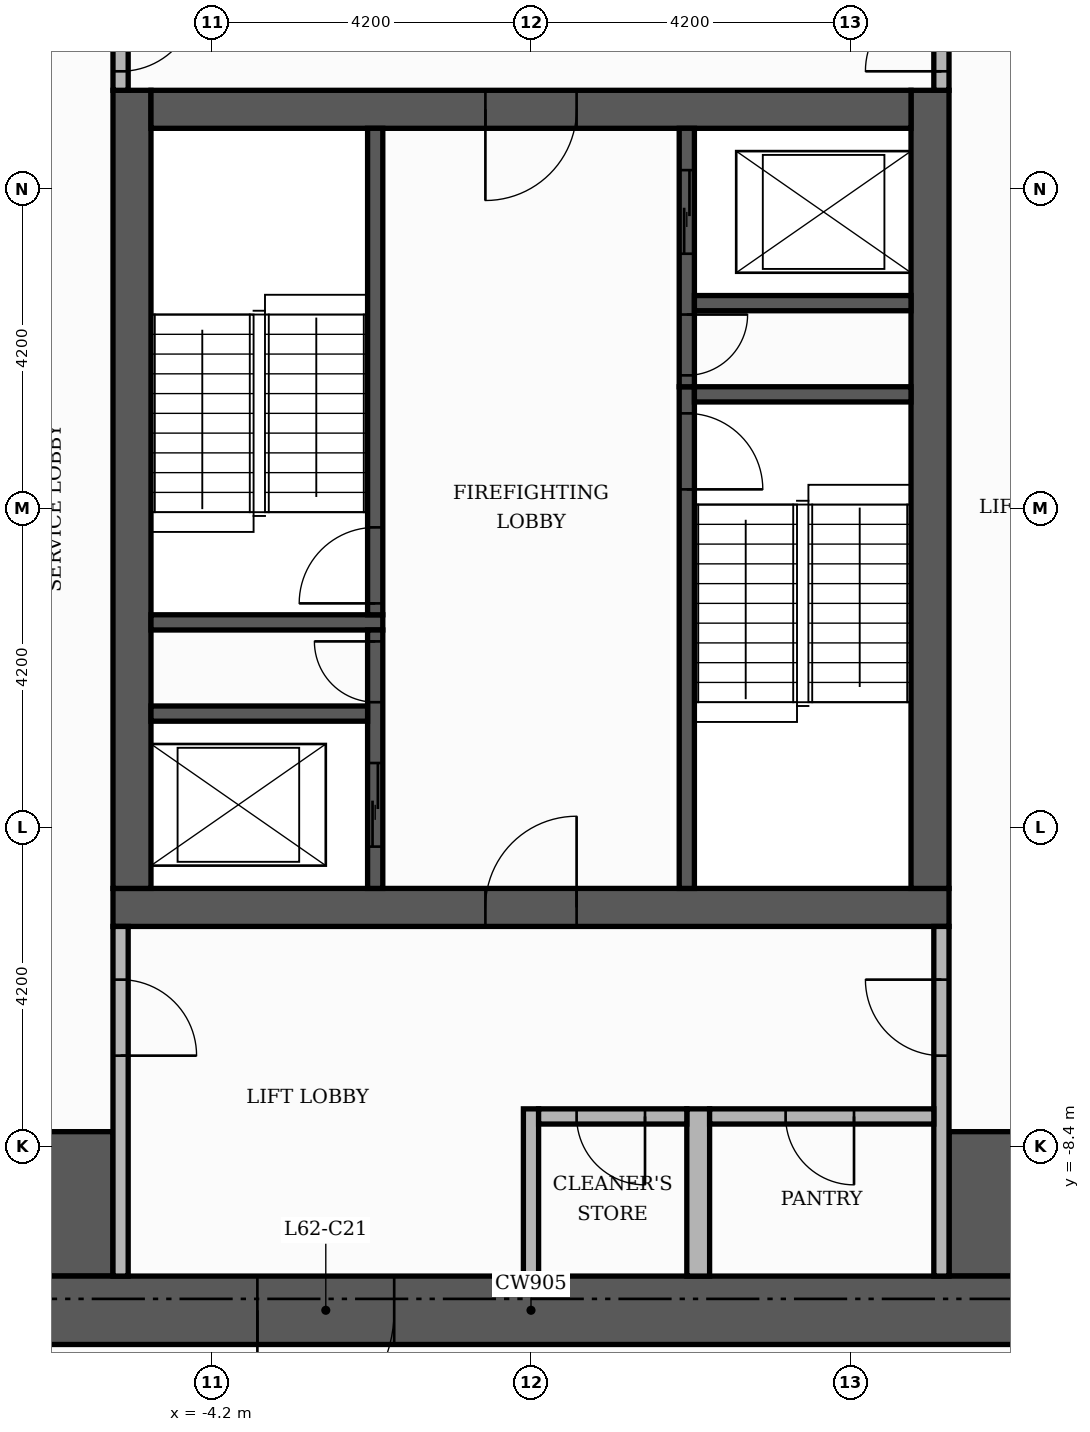
"""IFC4 building model, lengths in metres.
Left out: names, types, materials, properties, quantities, classifications, styles, units other than length and angle.
Written with IfcOpenShell. Run it as: python <this file> out.ifc"""

import sys

from ifc_helpers import new_model, si_unit, direction, frame, frame_2d, origin, place, context, subcontext, project, spatial, rectangle, extrude, element, fill, save


model = new_model("IFC4")
c1 = context("Model", 3, precision=1e-05, world=origin(), true_north=direction((0.0, 1.0)))
c2 = subcontext(c1, "Body", "Model", "MODEL_VIEW")
j1 = project(units=[si_unit("LENGTHUNIT", "METRE"), si_unit("PLANEANGLEUNIT", "RADIAN")], contexts=[c1])
p1 = place(None, origin())
s1 = spatial("IfcSite", under=j1, at=p1, CompositionType="ELEMENT")
p2 = place(p1, origin())
s2 = spatial("IfcBuilding", under=s1, at=p2, CompositionType="ELEMENT")
p3 = place(p2, frame((0.0, 0.0, 260.1)))
s3 = spatial("IfcBuildingStorey", under=s2, at=p3, CompositionType="ELEMENT", Elevation=260.1)
p4 = place(p3, frame((-5.5, -5.25, 0.0), z_axis=(0.0, 0.0, 1.0), x_axis=(1.0, 0.0, 0.0)))
e1 = element("IfcWall", 1, at=p4, inside=s3, PredefinedType="SHEAR", context=c2, shape_type="SweptSolid", body=[
    extrude(rectangle(XDim=11.0, YDim=0.5, at=frame_2d((5.5, 0.0))), origin(), (0.0, 0.0, 1.0), 3.48),
])
p5 = place(p4, frame((4.9, 0.0, 0.0)))
e2 = element("IfcOpeningElement", 2, at=p5, cuts=e1, PredefinedType="OPENING", context=c2, shape_type="SweptSolid", body=[
    extrude(rectangle(XDim=1.2, YDim=2.1, at=frame_2d((0.6, 1.05))), frame((0.0, 0.26, 0.0), z_axis=(0.0, -1.0, 0.0), x_axis=(1.0, 0.0, 0.0)), (0.0, 0.0, 1.0), 0.52),
])
for number, where, z_axis, x_axis in (
    (3, (-5.25, -5.0, 0.0), (0.0, 0.0, 1.0), (0.0, 1.0, 0.0)),
    (4, (5.25, -5.0, 0.0), (0.0, 0.0, 1.0), (0.0, 1.0, 0.0)),
):
    element("IfcWall", number, at=place(p3, frame(where, z_axis=z_axis, x_axis=x_axis)), inside=s3, PredefinedType="SHEAR", context=c2, shape_type="SweptSolid", body=[
        extrude(rectangle(XDim=10.5, YDim=0.5, at=frame_2d((5.25, 0.0))), origin(), (0.0, 0.0, 1.0), 3.48),
    ])
p6 = place(p3, frame((-5.0, 5.25, 0.0), z_axis=(0.0, 0.0, 1.0), x_axis=(1.0, 0.0, 0.0)))
e5 = element("IfcWall", 5, at=p6, inside=s3, PredefinedType="SHEAR", context=c2, shape_type="SweptSolid", body=[
    extrude(rectangle(XDim=10.0, YDim=0.5, at=frame_2d((5.0, 0.0))), origin(), (0.0, 0.0, 1.0), 3.48),
])
p7 = place(p6, frame((4.4, 0.0, 0.0)))
e6 = element("IfcOpeningElement", 6, at=p7, cuts=e5, PredefinedType="OPENING", context=c2, shape_type="SweptSolid", body=[
    extrude(rectangle(XDim=1.2, YDim=2.1, at=frame_2d((0.6, 1.05))), frame((0.0, 0.26, 0.0), z_axis=(0.0, -1.0, 0.0), x_axis=(1.0, 0.0, 0.0)), (0.0, 0.0, 1.0), 0.52),
])
for number, where, z_axis, x_axis in (
    (7, (-10.1, -9.15, 0.0), (0.0, 0.0, 1.0), (1.0, 0.0, 0.0)),
    (8, (5.5, -9.15, 0.0), (0.0, 0.0, 1.0), (1.0, 0.0, 0.0)),
):
    element("IfcWall", number, at=place(p3, frame(where, z_axis=z_axis, x_axis=x_axis)), inside=s3, PredefinedType="SHEAR", context=c2, shape_type="SweptSolid", body=[
        extrude(rectangle(XDim=4.6, YDim=1.9, at=frame_2d((2.3, 0.0))), origin(), (0.0, 0.0, 1.0), 3.48),
    ])
p8 = place(p3, frame((2.05, -5.0, 0.0), z_axis=(0.0, 0.0, 1.0), x_axis=(0.0, 1.0, 0.0)))
e9 = element("IfcWall", 9, at=p8, inside=s3, PredefinedType="SHEAR", context=c2, shape_type="SweptSolid", body=[
    extrude(rectangle(XDim=6.6, YDim=0.2, at=frame_2d((3.3, 0.0))), origin(), (0.0, 0.0, 1.0), 3.48),
])
p9 = place(p8, frame((5.25, 0.0, 0.0)))
e10 = element("IfcOpeningElement", 10, at=p9, cuts=e9, PredefinedType="OPENING", context=c2, shape_type="SweptSolid", body=[
    extrude(rectangle(XDim=1.0, YDim=2.1, at=frame_2d((0.5, 1.05))), frame((0.0, 0.11, 0.0), z_axis=(0.0, -1.0, 0.0), x_axis=(1.0, 0.0, 0.0)), (0.0, 0.0, 1.0), 0.22),
])
p10 = place(p3, frame((-5.0, -1.5, 0.0), z_axis=(0.0, 0.0, 1.0), x_axis=(1.0, 0.0, 0.0)))
e11 = element("IfcWall", 11, at=p10, inside=s3, PredefinedType="SHEAR", context=c2, shape_type="SweptSolid", body=[
    extrude(rectangle(XDim=3.05, YDim=0.2, at=frame_2d((1.525, 0.0))), origin(), (0.0, 0.0, 1.0), 3.48),
])
p11 = place(p3, frame((-2.05, -1.4, 0.0), z_axis=(0.0, 0.0, 1.0), x_axis=(0.0, 1.0, 0.0)))
e12 = element("IfcWall", 12, at=p11, inside=s3, PredefinedType="SHEAR", context=c2, shape_type="SweptSolid", body=[
    extrude(rectangle(XDim=6.4, YDim=0.2, at=frame_2d((3.2, 0.0))), origin(), (0.0, 0.0, 1.0), 3.48),
])
p12 = place(p11, frame((0.15, 0.0, 0.0)))
e13 = element("IfcOpeningElement", 13, at=p12, cuts=e12, PredefinedType="OPENING", context=c2, shape_type="SweptSolid", body=[
    extrude(rectangle(XDim=1.0, YDim=2.1, at=frame_2d((0.5, 1.05))), frame((0.0, 0.11, 0.0), z_axis=(0.0, -1.0, 0.0), x_axis=(1.0, 0.0, 0.0)), (0.0, 0.0, 1.0), 0.22),
])
p13 = place(p3, frame((2.15, 1.5, 0.0), z_axis=(0.0, 0.0, 1.0), x_axis=(1.0, 0.0, 0.0)))
e14 = element("IfcWall", 14, at=p13, inside=s3, PredefinedType="SHEAR", context=c2, shape_type="SweptSolid", body=[
    extrude(rectangle(XDim=2.85, YDim=0.2, at=frame_2d((1.425, 0.0))), origin(), (0.0, 0.0, 1.0), 3.48),
])
p14 = place(p3, frame((-2.05, -5.0, 0.0), z_axis=(0.0, 0.0, 1.0), x_axis=(0.0, 1.0, 0.0)))
e15 = element("IfcWall", 15, at=p14, inside=s3, PredefinedType="SHEAR", context=c2, shape_type="SweptSolid", body=[
    extrude(rectangle(XDim=3.4, YDim=0.2, at=frame_2d((1.7, 0.0))), origin(), (0.0, 0.0, 1.0), 3.48),
])
p15 = place(p14, frame((0.55, 0.0, 0.0)))
e16 = element("IfcOpeningElement", 16, at=p15, cuts=e15, PredefinedType="OPENING", context=c2, shape_type="SweptSolid", body=[
    extrude(rectangle(XDim=1.1, YDim=2.1, at=frame_2d((0.55, 1.05))), frame((0.0, 0.11, 0.0), z_axis=(0.0, -1.0, 0.0), x_axis=(1.0, 0.0, 0.0)), (0.0, 0.0, 1.0), 0.22),
])
p16 = place(p14, frame((2.45, 0.0, 0.0)))
e17 = element("IfcOpeningElement", 17, at=p16, cuts=e15, PredefinedType="OPENING", context=c2, shape_type="SweptSolid", body=[
    extrude(rectangle(XDim=0.8, YDim=2.1, at=frame_2d((0.4, 1.05))), frame((0.0, 0.11, 0.0), z_axis=(0.0, -1.0, 0.0), x_axis=(1.0, 0.0, 0.0)), (0.0, 0.0, 1.0), 0.22),
])
p17 = place(p3, frame((-5.0, -2.7, 0.0), z_axis=(0.0, 0.0, 1.0), x_axis=(1.0, 0.0, 0.0)))
e18 = element("IfcWall", 18, at=p17, inside=s3, PredefinedType="SHEAR", context=c2, shape_type="SweptSolid", body=[
    extrude(rectangle(XDim=2.85, YDim=0.2, at=frame_2d((1.425, 0.0))), origin(), (0.0, 0.0, 1.0), 3.48),
])
p18 = place(p3, frame((2.05, 1.6, 0.0), z_axis=(0.0, 0.0, 1.0), x_axis=(0.0, 1.0, 0.0)))
e19 = element("IfcWall", 19, at=p18, inside=s3, PredefinedType="SHEAR", context=c2, shape_type="SweptSolid", body=[
    extrude(rectangle(XDim=3.4, YDim=0.2, at=frame_2d((1.7, 0.0))), origin(), (0.0, 0.0, 1.0), 3.48),
])
p19 = place(p18, frame((1.75, 0.0, 0.0)))
e20 = element("IfcOpeningElement", 20, at=p19, cuts=e19, PredefinedType="OPENING", context=c2, shape_type="SweptSolid", body=[
    extrude(rectangle(XDim=1.1, YDim=2.1, at=frame_2d((0.55, 1.05))), frame((0.0, 0.11, 0.0), z_axis=(0.0, -1.0, 0.0), x_axis=(1.0, 0.0, 0.0)), (0.0, 0.0, 1.0), 0.22),
])
p20 = place(p18, frame((0.15, 0.0, 0.0)))
e21 = element("IfcOpeningElement", 21, at=p20, cuts=e19, PredefinedType="OPENING", context=c2, shape_type="SweptSolid", body=[
    extrude(rectangle(XDim=0.8, YDim=2.1, at=frame_2d((0.4, 1.05))), frame((0.0, 0.11, 0.0), z_axis=(0.0, -1.0, 0.0), x_axis=(1.0, 0.0, 0.0)), (0.0, 0.0, 1.0), 0.22),
])
p21 = place(p3, frame((2.15, 2.7, 0.0), z_axis=(0.0, 0.0, 1.0), x_axis=(1.0, 0.0, 0.0)))
e22 = element("IfcWall", 22, at=p21, inside=s3, PredefinedType="SHEAR", context=c2, shape_type="SweptSolid", body=[
    extrude(rectangle(XDim=2.85, YDim=0.2, at=frame_2d((1.425, 0.0))), origin(), (0.0, 0.0, 1.0), 3.48),
])
p22 = place(p3, frame((-11.0, -10.55, 0.0), z_axis=(0.0, 0.0, 1.0), x_axis=(1.0, 0.0, 0.0)))
e23 = element("IfcWall", 23, at=p22, inside=s3, PredefinedType="SHEAR", context=c2, shape_type="SweptSolid", body=[
    extrude(rectangle(XDim=22.0, YDim=0.9, at=frame_2d((11.0, 0.0))), origin(), (0.0, 0.0, 1.0), 3.48),
])
p23 = place(p22, frame((7.4, 0.0, 0.0)))
e24 = element("IfcOpeningElement", 24, at=p23, cuts=e23, PredefinedType="OPENING", context=c2, shape_type="SweptSolid", body=[
    extrude(rectangle(XDim=1.8, YDim=2.2, at=frame_2d((0.9, 1.1))), frame((0.0, 0.46, 0.0), z_axis=(0.0, -1.0, 0.0), x_axis=(1.0, 0.0, 0.0)), (0.0, 0.0, 1.0), 0.92),
])
p24 = place(p3, frame((-5.4, -10.1, 0.0), z_axis=(0.0, 0.0, 1.0), x_axis=(0.0, 1.0, 0.0)))
e25 = element("IfcWall", 25, at=p24, inside=s3, PredefinedType="PARTITIONING", context=c2, shape_type="SweptSolid", body=[
    extrude(rectangle(XDim=4.6, YDim=0.2, at=frame_2d((2.3, 0.0))), origin(), (0.0, 0.0, 1.0), 3.48),
])
p25 = place(p24, frame((2.9, 0.0, 0.0)))
e26 = element("IfcOpeningElement", 26, at=p25, cuts=e25, PredefinedType="OPENING", context=c2, shape_type="SweptSolid", body=[
    extrude(rectangle(XDim=1.0, YDim=2.1, at=frame_2d((0.5, 1.05))), frame((0.0, 0.11, 0.0), z_axis=(0.0, -1.0, 0.0), x_axis=(1.0, 0.0, 0.0)), (0.0, 0.0, 1.0), 0.22),
])
p26 = place(p3, frame((0.0, -10.1, 0.0), z_axis=(0.0, 0.0, 1.0), x_axis=(0.0, 1.0, 0.0)))
e27 = element("IfcWall", 27, at=p26, inside=s3, PredefinedType="PARTITIONING", context=c2, shape_type="SweptSolid", body=[
    extrude(rectangle(XDim=2.2, YDim=0.2, at=frame_2d((1.1, 0.0))), origin(), (0.0, 0.0, 1.0), 3.48),
])
p27 = place(p3, frame((2.2, -10.1, 0.0), z_axis=(0.0, 0.0, 1.0), x_axis=(0.0, 1.0, 0.0)))
e28 = element("IfcWall", 28, at=p27, inside=s3, PredefinedType="PARTITIONING", context=c2, shape_type="SweptSolid", body=[
    extrude(rectangle(XDim=2.2, YDim=0.3, at=frame_2d((1.1, 0.0))), origin(), (0.0, 0.0, 1.0), 3.48),
])
p28 = place(p3, frame((5.4, -10.1, 0.0), z_axis=(0.0, 0.0, 1.0), x_axis=(0.0, 1.0, 0.0)))
e29 = element("IfcWall", 29, at=p28, inside=s3, PredefinedType="PARTITIONING", context=c2, shape_type="SweptSolid", body=[
    extrude(rectangle(XDim=4.6, YDim=0.2, at=frame_2d((2.3, 0.0))), origin(), (0.0, 0.0, 1.0), 3.48),
])
p29 = place(p28, frame((2.9, 0.0, 0.0)))
e30 = element("IfcOpeningElement", 30, at=p29, cuts=e29, PredefinedType="OPENING", context=c2, shape_type="SweptSolid", body=[
    extrude(rectangle(XDim=1.0, YDim=2.1, at=frame_2d((0.5, 1.05))), frame((0.0, 0.11, 0.0), z_axis=(0.0, -1.0, 0.0), x_axis=(1.0, 0.0, 0.0)), (0.0, 0.0, 1.0), 0.22),
])
p30 = place(p3, frame((0.1, -8.0, 0.0), z_axis=(0.0, 0.0, 1.0), x_axis=(1.0, 0.0, 0.0)))
e31 = element("IfcWall", 31, at=p30, inside=s3, PredefinedType="PARTITIONING", context=c2, shape_type="SweptSolid", body=[
    extrude(rectangle(XDim=1.95, YDim=0.2, at=frame_2d((0.975, 0.0))), origin(), (0.0, 0.0, 1.0), 3.48),
])
p31 = place(p30, frame((0.5, 0.0, 0.0)))
e32 = element("IfcOpeningElement", 32, at=p31, cuts=e31, PredefinedType="OPENING", context=c2, shape_type="SweptSolid", body=[
    extrude(rectangle(XDim=0.9, YDim=2.1, at=frame_2d((0.45, 1.05))), frame((0.0, 0.11, 0.0), z_axis=(0.0, -1.0, 0.0), x_axis=(1.0, 0.0, 0.0)), (0.0, 0.0, 1.0), 0.22),
])
p32 = place(p3, frame((2.35, -8.0, 0.0), z_axis=(0.0, 0.0, 1.0), x_axis=(1.0, 0.0, 0.0)))
e33 = element("IfcWall", 33, at=p32, inside=s3, PredefinedType="PARTITIONING", context=c2, shape_type="SweptSolid", body=[
    extrude(rectangle(XDim=2.95, YDim=0.2, at=frame_2d((1.475, 0.0))), origin(), (0.0, 0.0, 1.0), 3.48),
])
p33 = place(p32, frame((1.0, 0.0, 0.0)))
e34 = element("IfcOpeningElement", 34, at=p33, cuts=e33, PredefinedType="OPENING", context=c2, shape_type="SweptSolid", body=[
    extrude(rectangle(XDim=0.9, YDim=2.1, at=frame_2d((0.45, 1.05))), frame((0.0, 0.11, 0.0), z_axis=(0.0, -1.0, 0.0), x_axis=(1.0, 0.0, 0.0)), (0.0, 0.0, 1.0), 0.22),
])
p34 = place(p3, frame((-5.4, 5.5, 0.0), z_axis=(0.0, 0.0, 1.0), x_axis=(0.0, 1.0, 0.0)))
e35 = element("IfcWall", 35, at=p34, inside=s3, PredefinedType="PARTITIONING", context=c2, shape_type="SweptSolid", body=[
    extrude(rectangle(XDim=1.55, YDim=0.2, at=frame_2d((0.775, 0.0))), origin(), (0.0, 0.0, 1.0), 3.48),
])
p35 = place(p34, frame((0.25, 0.0, 0.0)))
e36 = element("IfcOpeningElement", 36, at=p35, cuts=e35, PredefinedType="OPENING", context=c2, shape_type="SweptSolid", body=[
    extrude(rectangle(XDim=1.0, YDim=2.1, at=frame_2d((0.5, 1.05))), frame((0.0, 0.11, 0.0), z_axis=(0.0, -1.0, 0.0), x_axis=(1.0, 0.0, 0.0)), (0.0, 0.0, 1.0), 0.22),
])
p36 = place(p3, frame((5.4, 5.5, 0.0), z_axis=(0.0, 0.0, 1.0), x_axis=(0.0, 1.0, 0.0)))
e37 = element("IfcWall", 37, at=p36, inside=s3, PredefinedType="PARTITIONING", context=c2, shape_type="SweptSolid", body=[
    extrude(rectangle(XDim=4.6, YDim=0.2, at=frame_2d((2.3, 0.0))), origin(), (0.0, 0.0, 1.0), 3.48),
])
p37 = place(p36, frame((0.25, 0.0, 0.0)))
e38 = element("IfcOpeningElement", 38, at=p37, cuts=e37, PredefinedType="OPENING", context=c2, shape_type="SweptSolid", body=[
    extrude(rectangle(XDim=1.0, YDim=2.1, at=frame_2d((0.5, 1.05))), frame((0.0, 0.11, 0.0), z_axis=(0.0, -1.0, 0.0), x_axis=(1.0, 0.0, 0.0)), (0.0, 0.0, 1.0), 0.22),
])
p38 = place(p19, origin())
e39 = element("IfcDoor", 39, at=p38, inside=s3, OperationType="SLIDING_TO_LEFT", PredefinedType="DOOR", context=c2, shape_type="SweptSolid", body=[
    extrude(rectangle(XDim=1.1, YDim=2.1, at=frame_2d((0.55, 1.05))), frame((0.0, 0.025, 0.0), z_axis=(0.0, -1.0, 0.0), x_axis=(1.0, 0.0, 0.0)), (0.0, 0.0, 1.0), 0.05),
])
fill(e20, e39)
p39 = place(p15, origin())
e40 = element("IfcDoor", 40, at=p39, inside=s3, OperationType="SLIDING_TO_LEFT", PredefinedType="DOOR", context=c2, shape_type="SweptSolid", body=[
    extrude(rectangle(XDim=1.1, YDim=2.1, at=frame_2d((0.55, 1.05))), frame((0.0, 0.025, 0.0), z_axis=(0.0, -1.0, 0.0), x_axis=(1.0, 0.0, 0.0)), (0.0, 0.0, 1.0), 0.05),
])
fill(e16, e40)
p40 = place(p12, origin())
e41 = element("IfcDoor", 41, at=p40, inside=s3, OperationType="SINGLE_SWING_LEFT", PredefinedType="DOOR", context=c2, shape_type="SweptSolid", body=[
    extrude(rectangle(XDim=1.0, YDim=2.1, at=frame_2d((0.5, 1.05))), frame((0.0, 0.025, 0.0), z_axis=(0.0, -1.0, 0.0), x_axis=(1.0, 0.0, 0.0)), (0.0, 0.0, 1.0), 0.05),
])
fill(e13, e41)
p41 = place(p9, frame((1.0, 0.0, 0.0), z_axis=(0.0, 0.0, 1.0), x_axis=(-1.0, 0.0, 0.0)))
e42 = element("IfcDoor", 42, at=p41, inside=s3, OperationType="SINGLE_SWING_LEFT", PredefinedType="DOOR", context=c2, shape_type="SweptSolid", body=[
    extrude(rectangle(XDim=1.0, YDim=2.1, at=frame_2d((0.5, 1.05))), frame((0.0, 0.025, 0.0), z_axis=(0.0, -1.0, 0.0), x_axis=(1.0, 0.0, 0.0)), (0.0, 0.0, 1.0), 0.05),
])
fill(e10, e42)
p42 = place(p20, frame((0.8, 0.0, 0.0), z_axis=(0.0, 0.0, 1.0), x_axis=(-1.0, 0.0, 0.0)))
e43 = element("IfcDoor", 43, at=p42, inside=s3, OperationType="SINGLE_SWING_RIGHT", PredefinedType="DOOR", context=c2, shape_type="SweptSolid", body=[
    extrude(rectangle(XDim=0.8, YDim=2.1, at=frame_2d((0.4, 1.05))), frame((0.0, 0.025, 0.0), z_axis=(0.0, -1.0, 0.0), x_axis=(1.0, 0.0, 0.0)), (0.0, 0.0, 1.0), 0.05),
])
fill(e21, e43)
p43 = place(p16, origin())
e44 = element("IfcDoor", 44, at=p43, inside=s3, OperationType="SINGLE_SWING_RIGHT", PredefinedType="DOOR", context=c2, shape_type="SweptSolid", body=[
    extrude(rectangle(XDim=0.8, YDim=2.1, at=frame_2d((0.4, 1.05))), frame((0.0, 0.025, 0.0), z_axis=(0.0, -1.0, 0.0), x_axis=(1.0, 0.0, 0.0)), (0.0, 0.0, 1.0), 0.05),
])
fill(e17, e44)
p44 = place(p7, frame((1.2, 0.0, 0.0), z_axis=(0.0, 0.0, 1.0), x_axis=(-1.0, 0.0, 0.0)))
e45 = element("IfcDoor", 45, at=p44, inside=s3, OperationType="SINGLE_SWING_LEFT", PredefinedType="DOOR", context=c2, shape_type="SweptSolid", body=[
    extrude(rectangle(XDim=1.2, YDim=2.1, at=frame_2d((0.6, 1.05))), frame((0.0, 0.025, 0.0), z_axis=(0.0, -1.0, 0.0), x_axis=(1.0, 0.0, 0.0)), (0.0, 0.0, 1.0), 0.05),
])
fill(e6, e45)
p45 = place(p5, origin())
e46 = element("IfcDoor", 46, at=p45, inside=s3, OperationType="SINGLE_SWING_RIGHT", PredefinedType="DOOR", context=c2, shape_type="SweptSolid", body=[
    extrude(rectangle(XDim=1.2, YDim=2.1, at=frame_2d((0.6, 1.05))), frame((0.0, 0.025, 0.0), z_axis=(0.0, -1.0, 0.0), x_axis=(1.0, 0.0, 0.0)), (0.0, 0.0, 1.0), 0.05),
])
fill(e2, e46)
p46 = place(p35, frame((1.0, 0.0, 0.0), z_axis=(0.0, 0.0, 1.0), x_axis=(-1.0, 0.0, 0.0)))
e47 = element("IfcDoor", 47, at=p46, inside=s3, OperationType="SINGLE_SWING_RIGHT", PredefinedType="DOOR", context=c2, shape_type="SweptSolid", body=[
    extrude(rectangle(XDim=1.0, YDim=2.1, at=frame_2d((0.5, 1.05))), frame((0.0, 0.025, 0.0), z_axis=(0.0, -1.0, 0.0), x_axis=(1.0, 0.0, 0.0)), (0.0, 0.0, 1.0), 0.05),
])
fill(e36, e47)
p47 = place(p37, origin())
e48 = element("IfcDoor", 48, at=p47, inside=s3, OperationType="SINGLE_SWING_LEFT", PredefinedType="DOOR", context=c2, shape_type="SweptSolid", body=[
    extrude(rectangle(XDim=1.0, YDim=2.1, at=frame_2d((0.5, 1.05))), frame((0.0, 0.025, 0.0), z_axis=(0.0, -1.0, 0.0), x_axis=(1.0, 0.0, 0.0)), (0.0, 0.0, 1.0), 0.05),
])
fill(e38, e48)
p48 = place(p25, frame((1.0, 0.0, 0.0), z_axis=(0.0, 0.0, 1.0), x_axis=(-1.0, 0.0, 0.0)))
e49 = element("IfcDoor", 49, at=p48, inside=s3, OperationType="SINGLE_SWING_LEFT", PredefinedType="DOOR", context=c2, shape_type="SweptSolid", body=[
    extrude(rectangle(XDim=1.0, YDim=2.1, at=frame_2d((0.5, 1.05))), frame((0.0, 0.025, 0.0), z_axis=(0.0, -1.0, 0.0), x_axis=(1.0, 0.0, 0.0)), (0.0, 0.0, 1.0), 0.05),
])
fill(e26, e49)
p49 = place(p29, origin())
e50 = element("IfcDoor", 50, at=p49, inside=s3, OperationType="SINGLE_SWING_RIGHT", PredefinedType="DOOR", context=c2, shape_type="SweptSolid", body=[
    extrude(rectangle(XDim=1.0, YDim=2.1, at=frame_2d((0.5, 1.05))), frame((0.0, 0.025, 0.0), z_axis=(0.0, -1.0, 0.0), x_axis=(1.0, 0.0, 0.0)), (0.0, 0.0, 1.0), 0.05),
])
fill(e30, e50)
p50 = place(p23, frame((1.8, 0.0, 0.0), z_axis=(0.0, 0.0, 1.0), x_axis=(-1.0, 0.0, 0.0)))
e51 = element("IfcDoor", 51, at=p50, inside=s3, OperationType="DOUBLE_DOOR_SINGLE_SWING", PredefinedType="DOOR", context=c2, shape_type="SweptSolid", body=[
    extrude(rectangle(XDim=1.8, YDim=2.2, at=frame_2d((0.9, 1.1))), frame((0.0, 0.025, 0.0), z_axis=(0.0, -1.0, 0.0), x_axis=(1.0, 0.0, 0.0)), (0.0, 0.0, 1.0), 0.05),
])
fill(e24, e51)
p51 = place(p31, frame((0.9, 0.0, 0.0), z_axis=(0.0, 0.0, 1.0), x_axis=(-1.0, 0.0, 0.0)))
e52 = element("IfcDoor", 52, at=p51, inside=s3, OperationType="SINGLE_SWING_RIGHT", PredefinedType="DOOR", context=c2, shape_type="SweptSolid", body=[
    extrude(rectangle(XDim=0.9, YDim=2.1, at=frame_2d((0.45, 1.05))), frame((0.0, 0.025, 0.0), z_axis=(0.0, -1.0, 0.0), x_axis=(1.0, 0.0, 0.0)), (0.0, 0.0, 1.0), 0.05),
])
fill(e32, e52)
p52 = place(p33, frame((0.9, 0.0, 0.0), z_axis=(0.0, 0.0, 1.0), x_axis=(-1.0, 0.0, 0.0)))
e53 = element("IfcDoor", 53, at=p52, inside=s3, OperationType="SINGLE_SWING_RIGHT", PredefinedType="DOOR", context=c2, shape_type="SweptSolid", body=[
    extrude(rectangle(XDim=0.9, YDim=2.1, at=frame_2d((0.45, 1.05))), frame((0.0, 0.025, 0.0), z_axis=(0.0, -1.0, 0.0), x_axis=(1.0, 0.0, 0.0)), (0.0, 0.0, 1.0), 0.05),
])
fill(e34, e53)
save(model, sys.argv[1])
